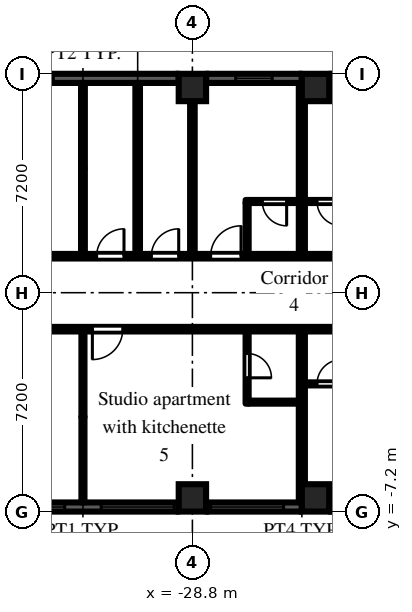
"""IFC4 building model, lengths in metres.
Left out: names, types, materials, properties, quantities, classifications, styles, units other than length and angle.
Written with IfcOpenShell. Run it as: python <this file> out.ifc"""

import sys

from ifc_helpers import new_model, si_unit, direction, frame, frame_2d, origin, origin_2d, place, context, subcontext, project, spatial, rectangle, extrude, element, fill, save


model = new_model("IFC4")
c1 = context("Model", 3, precision=1e-05, world=origin(), true_north=direction((0.0, 1.0)))
c2 = subcontext(c1, "Body", "Model", "MODEL_VIEW")
j1 = project(units=[si_unit("LENGTHUNIT", "METRE"), si_unit("PLANEANGLEUNIT", "RADIAN")], contexts=[c1])
p1 = place(None, origin())
s1 = spatial("IfcSite", under=j1, at=p1, CompositionType="ELEMENT")
p2 = place(p1, origin())
s2 = spatial("IfcBuilding", under=s1, at=p2, CompositionType="ELEMENT")
p3 = place(p2, frame((0.0, 0.0, 44.7)))
s3 = spatial("IfcBuildingStorey", under=s2, at=p3, CompositionType="ELEMENT", Elevation=44.7)
for number, where, z_axis, x_axis in (
    (1, (-28.8, -6.75, 0.0), (0.0, 0.0, 1.0), (1.0, 0.0, 0.0)),
    (2, (-28.8, 6.75, 0.0), (0.0, 0.0, 1.0), (1.0, 0.0, 0.0)),
    (3, (-24.75, -6.75, 0.0), (0.0, 0.0, 1.0), (1.0, 0.0, 0.0)),
    (4, (-24.75, 6.75, 0.0), (0.0, 0.0, 1.0), (1.0, 0.0, 0.0)),
):
    element("IfcColumn", number, at=place(p3, frame(where, z_axis=z_axis, x_axis=x_axis)), inside=s3, PredefinedType="COLUMN", context=c2, shape_type="SweptSolid", body=[
        extrude(rectangle(XDim=0.9, YDim=0.9, at=origin_2d()), origin(), (0.0, 0.0, 1.0), 3.0),
    ])
p4 = place(p3, frame((-21.6, 7.05, 0.0), z_axis=(0.0, 0.0, 1.0), x_axis=(-1.0, 0.0, 0.0)))
e5 = element("IfcWall", 5, at=p4, inside=s3, PredefinedType="SOLIDWALL", context=c2, shape_type="SweptSolid", body=[
    extrude(rectangle(XDim=2.7, YDim=0.3, at=frame_2d((1.35, 0.0))), origin(), (0.0, 0.0, 1.0), 2.1),
])
p5 = place(p4, frame((0.75, 0.0, 0.2)))
e6 = element("IfcOpeningElement", 6, at=p5, cuts=e5, PredefinedType="OPENING", context=c2, shape_type="SweptSolid", body=[
    extrude(rectangle(XDim=1.2, YDim=1.85, at=frame_2d((0.6, 0.925))), frame((0.0, 0.16, 0.0), z_axis=(0.0, -1.0, 0.0), x_axis=(1.0, 0.0, 0.0)), (0.0, 0.0, 1.0), 0.32),
])
p6 = place(p3, frame((-25.2, 7.05, 0.0), z_axis=(0.0, 0.0, 1.0), x_axis=(-1.0, 0.0, 0.0)))
e7 = element("IfcWall", 7, at=p6, inside=s3, PredefinedType="SOLIDWALL", context=c2, shape_type="SweptSolid", body=[
    extrude(rectangle(XDim=3.15, YDim=0.3, at=frame_2d((1.575, 0.0))), origin(), (0.0, 0.0, 1.0), 2.1),
])
p7 = place(p6, frame((0.975, 0.0, 0.2)))
e8 = element("IfcOpeningElement", 8, at=p7, cuts=e7, PredefinedType="OPENING", context=c2, shape_type="SweptSolid", body=[
    extrude(rectangle(XDim=1.2, YDim=1.85, at=frame_2d((0.6, 0.925))), frame((0.0, 0.16, 0.0), z_axis=(0.0, -1.0, 0.0), x_axis=(1.0, 0.0, 0.0)), (0.0, 0.0, 1.0), 0.32),
])
p8 = place(p3, frame((-29.25, 7.05, 0.0), z_axis=(0.0, 0.0, 1.0), x_axis=(-1.0, 0.0, 0.0)))
e9 = element("IfcWall", 9, at=p8, inside=s3, PredefinedType="SOLIDWALL", context=c2, shape_type="SweptSolid", body=[
    extrude(rectangle(XDim=6.3, YDim=0.3, at=frame_2d((3.15, 0.0))), origin(), (0.0, 0.0, 1.0), 2.1),
])
p9 = place(p8, frame((4.125, 0.0, 0.2)))
e10 = element("IfcOpeningElement", 10, at=p9, cuts=e9, PredefinedType="OPENING", context=c2, shape_type="SweptSolid", body=[
    extrude(rectangle(XDim=1.2, YDim=1.85, at=frame_2d((0.6, 0.925))), frame((0.0, 0.16, 0.0), z_axis=(0.0, -1.0, 0.0), x_axis=(1.0, 0.0, 0.0)), (0.0, 0.0, 1.0), 0.32),
])
p10 = place(p3, frame((-35.55, -7.05, 0.0), z_axis=(0.0, 0.0, 1.0), x_axis=(1.0, 0.0, 0.0)))
e11 = element("IfcWall", 11, at=p10, inside=s3, PredefinedType="SOLIDWALL", context=c2, shape_type="SweptSolid", body=[
    extrude(rectangle(XDim=6.3, YDim=0.3, at=frame_2d((3.15, 0.0))), origin(), (0.0, 0.0, 1.0), 2.1),
])
p11 = place(p10, frame((0.15, 0.0, 0.2)))
e12 = element("IfcOpeningElement", 12, at=p11, cuts=e11, PredefinedType="OPENING", context=c2, shape_type="SweptSolid", body=[
    extrude(rectangle(XDim=2.4, YDim=1.85, at=frame_2d((1.2, 0.925))), frame((0.0, 0.16, 0.0), z_axis=(0.0, -1.0, 0.0), x_axis=(1.0, 0.0, 0.0)), (0.0, 0.0, 1.0), 0.32),
])
p12 = place(p10, frame((3.75, 0.0, 0.2)))
e13 = element("IfcOpeningElement", 13, at=p12, cuts=e11, PredefinedType="OPENING", context=c2, shape_type="SweptSolid", body=[
    extrude(rectangle(XDim=2.4, YDim=1.85, at=frame_2d((1.2, 0.925))), frame((0.0, 0.16, 0.0), z_axis=(0.0, -1.0, 0.0), x_axis=(1.0, 0.0, 0.0)), (0.0, 0.0, 1.0), 0.32),
])
p13 = place(p3, frame((-28.35, -7.05, 0.0), z_axis=(0.0, 0.0, 1.0), x_axis=(1.0, 0.0, 0.0)))
e14 = element("IfcWall", 14, at=p13, inside=s3, PredefinedType="SOLIDWALL", context=c2, shape_type="SweptSolid", body=[
    extrude(rectangle(XDim=3.15, YDim=0.3, at=frame_2d((1.575, 0.0))), origin(), (0.0, 0.0, 1.0), 2.1),
])
p14 = place(p13, frame((0.15, 0.0, 0.2)))
e15 = element("IfcOpeningElement", 15, at=p14, cuts=e14, PredefinedType="OPENING", context=c2, shape_type="SweptSolid", body=[
    extrude(rectangle(XDim=2.4, YDim=1.85, at=frame_2d((1.2, 0.925))), frame((0.0, 0.16, 0.0), z_axis=(0.0, -1.0, 0.0), x_axis=(1.0, 0.0, 0.0)), (0.0, 0.0, 1.0), 0.32),
])
p15 = place(p3, frame((-24.3, -7.05, 0.0), z_axis=(0.0, 0.0, 1.0), x_axis=(1.0, 0.0, 0.0)))
e16 = element("IfcWall", 16, at=p15, inside=s3, PredefinedType="SOLIDWALL", context=c2, shape_type="SweptSolid", body=[
    extrude(rectangle(XDim=2.7, YDim=0.3, at=frame_2d((1.35, 0.0))), origin(), (0.0, 0.0, 1.0), 2.1),
])
p16 = place(p15, frame((0.75, 0.0, 0.2)))
e17 = element("IfcOpeningElement", 17, at=p16, cuts=e16, PredefinedType="OPENING", context=c2, shape_type="SweptSolid", body=[
    extrude(rectangle(XDim=1.2, YDim=1.85, at=frame_2d((0.6, 0.925))), frame((0.0, 0.16, 0.0), z_axis=(0.0, -1.0, 0.0), x_axis=(1.0, 0.0, 0.0)), (0.0, 0.0, 1.0), 0.32),
])
p17 = place(p3, frame((-36.5, -1.2, 0.0), z_axis=(0.0, 0.0, 1.0), x_axis=(1.0, 0.0, 0.0)))
e18 = element("IfcWall", 18, at=p17, inside=s3, PredefinedType="PARTITIONING", context=c2, shape_type="SweptSolid", body=[
    extrude(rectangle(XDim=14.9, YDim=0.15, at=frame_2d((7.45, 0.0))), origin(), (0.0, 0.0, 1.0), 2.575),
])
p18 = place(p17, frame((13.3, 0.0, 0.0)))
e19 = element("IfcOpeningElement", 19, at=p18, cuts=e18, PredefinedType="OPENING", context=c2, shape_type="SweptSolid", body=[
    extrude(rectangle(XDim=1.0, YDim=2.1, at=frame_2d((0.5, 1.05))), frame((0.0, 0.085, 0.0), z_axis=(0.0, -1.0, 0.0), x_axis=(1.0, 0.0, 0.0)), (0.0, 0.0, 1.0), 0.17),
])
p19 = place(p17, frame((4.41, 0.0, 0.0)))
e20 = element("IfcOpeningElement", 20, at=p19, cuts=e18, PredefinedType="OPENING", context=c2, shape_type="SweptSolid", body=[
    extrude(rectangle(XDim=1.0, YDim=2.1, at=frame_2d((0.5, 1.05))), frame((0.0, 0.085, 0.0), z_axis=(0.0, -1.0, 0.0), x_axis=(1.0, 0.0, 0.0)), (0.0, 0.0, 1.0), 0.17),
])
p20 = place(p17, frame((1.15, 0.0, 0.0)))
e21 = element("IfcOpeningElement", 21, at=p20, cuts=e18, PredefinedType="OPENING", context=c2, shape_type="SweptSolid", body=[
    extrude(rectangle(XDim=1.8, YDim=2.1, at=frame_2d((0.9, 1.05))), frame((0.0, 0.085, 0.0), z_axis=(0.0, -1.0, 0.0), x_axis=(1.0, 0.0, 0.0)), (0.0, 0.0, 1.0), 0.17),
])
p21 = place(p3, frame((-36.5, 1.2, 0.0), z_axis=(0.0, 0.0, 1.0), x_axis=(1.0, 0.0, 0.0)))
e22 = element("IfcWall", 22, at=p21, inside=s3, PredefinedType="PARTITIONING", context=c2, shape_type="SweptSolid", body=[
    extrude(rectangle(XDim=14.9, YDim=0.15, at=frame_2d((7.45, 0.0))), origin(), (0.0, 0.0, 1.0), 2.575),
])
p22 = place(p21, frame((13.7, 0.0, 0.0)))
e23 = element("IfcOpeningElement", 23, at=p22, cuts=e22, PredefinedType="OPENING", context=c2, shape_type="SweptSolid", body=[
    extrude(rectangle(XDim=1.0, YDim=2.1, at=frame_2d((0.5, 1.05))), frame((0.0, 0.085, 0.0), z_axis=(0.0, -1.0, 0.0), x_axis=(1.0, 0.0, 0.0)), (0.0, 0.0, 1.0), 0.17),
])
p23 = place(p21, frame((8.3, 0.0, 0.0)))
e24 = element("IfcOpeningElement", 24, at=p23, cuts=e22, PredefinedType="OPENING", context=c2, shape_type="SweptSolid", body=[
    extrude(rectangle(XDim=1.0, YDim=2.1, at=frame_2d((0.5, 1.05))), frame((0.0, 0.085, 0.0), z_axis=(0.0, -1.0, 0.0), x_axis=(1.0, 0.0, 0.0)), (0.0, 0.0, 1.0), 0.17),
])
p24 = place(p21, frame((6.35, 0.0, 0.0)))
e25 = element("IfcOpeningElement", 25, at=p24, cuts=e22, PredefinedType="OPENING", context=c2, shape_type="SweptSolid", body=[
    extrude(rectangle(XDim=0.9, YDim=2.1, at=frame_2d((0.45, 1.05))), frame((0.0, 0.085, 0.0), z_axis=(0.0, -1.0, 0.0), x_axis=(1.0, 0.0, 0.0)), (0.0, 0.0, 1.0), 0.17),
])
p25 = place(p21, frame((4.55, 0.0, 0.0)))
e26 = element("IfcOpeningElement", 26, at=p25, cuts=e22, PredefinedType="OPENING", context=c2, shape_type="SweptSolid", body=[
    extrude(rectangle(XDim=0.9, YDim=2.1, at=frame_2d((0.45, 1.05))), frame((0.0, 0.085, 0.0), z_axis=(0.0, -1.0, 0.0), x_axis=(1.0, 0.0, 0.0)), (0.0, 0.0, 1.0), 0.17),
])
p26 = place(p21, frame((1.15, 0.0, 0.0)))
e27 = element("IfcOpeningElement", 27, at=p26, cuts=e22, PredefinedType="OPENING", context=c2, shape_type="SweptSolid", body=[
    extrude(rectangle(XDim=1.8, YDim=2.1, at=frame_2d((0.9, 1.05))), frame((0.0, 0.085, 0.0), z_axis=(0.0, -1.0, 0.0), x_axis=(1.0, 0.0, 0.0)), (0.0, 0.0, 1.0), 0.17),
])
p27 = place(p3, frame((-32.4, -6.9, 0.0), z_axis=(0.0, 0.0, 1.0), x_axis=(0.0, 1.0, 0.0)))
e28 = element("IfcWall", 28, at=p27, inside=s3, PredefinedType="PARTITIONING", context=c2, shape_type="SweptSolid", body=[
    extrude(rectangle(XDim=5.625, YDim=0.1, at=frame_2d((2.812, 0.0))), origin(), (0.0, 0.0, 1.0), 2.575),
])
p28 = place(p3, frame((-32.4, 1.275, 0.0), z_axis=(0.0, 0.0, 1.0), x_axis=(0.0, 1.0, 0.0)))
e29 = element("IfcWall", 29, at=p28, inside=s3, PredefinedType="PARTITIONING", context=c2, shape_type="SweptSolid", body=[
    extrude(rectangle(XDim=5.625, YDim=0.125, at=frame_2d((2.812, 0.0))), origin(), (0.0, 0.0, 1.0), 2.575),
])
for number, where, z_axis, x_axis in (
    (30, (-30.6, 1.275, 0.0), (0.0, 0.0, 1.0), (0.0, 1.0, 0.0)),
    (31, (-28.8, 1.275, 0.0), (0.0, 0.0, 1.0), (0.0, 1.0, 0.0)),
):
    element("IfcWall", number, at=place(p3, frame(where, z_axis=z_axis, x_axis=x_axis)), inside=s3, PredefinedType="PARTITIONING", context=c2, shape_type="SweptSolid", body=[
        extrude(rectangle(XDim=5.625, YDim=0.15, at=frame_2d((2.812, 0.0))), origin(), (0.0, 0.0, 1.0), 2.575),
    ])
p29 = place(p3, frame((-27.0, -3.65, 0.0), z_axis=(0.0, 0.0, 1.0), x_axis=(0.0, 1.0, 0.0)))
e32 = element("IfcWall", 32, at=p29, inside=s3, PredefinedType="PARTITIONING", context=c2, shape_type="SweptSolid", body=[
    extrude(rectangle(XDim=2.375, YDim=0.1, at=frame_2d((1.188, 0.0))), origin(), (0.0, 0.0, 1.0), 2.575),
])
p30 = place(p29, frame((0.85, 0.0, 0.0)))
e33 = element("IfcOpeningElement", 33, at=p30, cuts=e32, PredefinedType="OPENING", context=c2, shape_type="SweptSolid", body=[
    extrude(rectangle(XDim=0.8, YDim=2.1, at=frame_2d((0.4, 1.05))), frame((0.0, 0.06, 0.0), z_axis=(0.0, -1.0, 0.0), x_axis=(1.0, 0.0, 0.0)), (0.0, 0.0, 1.0), 0.12),
])
p31 = place(p3, frame((-26.95, -3.6, 0.0), z_axis=(0.0, 0.0, 1.0), x_axis=(1.0, 0.0, 0.0)))
e34 = element("IfcWall", 34, at=p31, inside=s3, PredefinedType="PARTITIONING", context=c2, shape_type="SweptSolid", body=[
    extrude(rectangle(XDim=1.65, YDim=0.1, at=frame_2d((0.825, 0.0))), origin(), (0.0, 0.0, 1.0), 2.575),
])
p32 = place(p3, frame((-27.0, 1.275, 0.0), z_axis=(0.0, 0.0, 1.0), x_axis=(0.0, 1.0, 0.0)))
e35 = element("IfcWall", 35, at=p32, inside=s3, PredefinedType="PARTITIONING", context=c2, shape_type="SweptSolid", body=[
    extrude(rectangle(XDim=1.675, YDim=0.1, at=frame_2d((0.837, 0.0))), origin(), (0.0, 0.0, 1.0), 2.575),
])
p33 = place(p3, frame((-27.05, 3.0, 0.0), z_axis=(0.0, 0.0, 1.0), x_axis=(1.0, 0.0, 0.0)))
e36 = element("IfcWall", 36, at=p33, inside=s3, PredefinedType="PARTITIONING", context=c2, shape_type="SweptSolid", body=[
    extrude(rectangle(XDim=3.7, YDim=0.1, at=frame_2d((1.85, 0.0))), origin(), (0.0, 0.0, 1.0), 2.575),
])
p34 = place(p33, frame((2.35, 0.0, 0.0)))
e37 = element("IfcOpeningElement", 37, at=p34, cuts=e36, PredefinedType="OPENING", context=c2, shape_type="SweptSolid", body=[
    extrude(rectangle(XDim=0.8, YDim=2.1, at=frame_2d((0.4, 1.05))), frame((0.0, 0.06, 0.0), z_axis=(0.0, -1.0, 0.0), x_axis=(1.0, 0.0, 0.0)), (0.0, 0.0, 1.0), 0.12),
])
p35 = place(p33, frame((0.55, 0.0, 0.0)))
e38 = element("IfcOpeningElement", 38, at=p35, cuts=e36, PredefinedType="OPENING", context=c2, shape_type="SweptSolid", body=[
    extrude(rectangle(XDim=0.8, YDim=2.1, at=frame_2d((0.4, 1.05))), frame((0.0, 0.06, 0.0), z_axis=(0.0, -1.0, 0.0), x_axis=(1.0, 0.0, 0.0)), (0.0, 0.0, 1.0), 0.12),
])
p36 = place(p3, frame((-25.2, -6.9, 0.0), z_axis=(0.0, 0.0, 1.0), x_axis=(0.0, 1.0, 0.0)))
e39 = element("IfcWall", 39, at=p36, inside=s3, PredefinedType="PARTITIONING", context=c2, shape_type="SweptSolid", body=[
    extrude(rectangle(XDim=5.625, YDim=0.2, at=frame_2d((2.812, 0.0))), origin(), (0.0, 0.0, 1.0), 2.575),
])
p37 = place(p3, frame((-25.1, -3.0, 0.0), z_axis=(0.0, 0.0, 1.0), x_axis=(1.0, 0.0, 0.0)))
e40 = element("IfcWall", 40, at=p37, inside=s3, PredefinedType="PARTITIONING", context=c2, shape_type="SweptSolid", body=[
    extrude(rectangle(XDim=1.75, YDim=0.1, at=frame_2d((0.875, 0.0))), origin(), (0.0, 0.0, 1.0), 2.575),
])
p38 = place(p37, frame((0.4, 0.0, 0.0)))
e41 = element("IfcOpeningElement", 41, at=p38, cuts=e40, PredefinedType="OPENING", context=c2, shape_type="SweptSolid", body=[
    extrude(rectangle(XDim=0.8, YDim=2.1, at=frame_2d((0.4, 1.05))), frame((0.0, 0.06, 0.0), z_axis=(0.0, -1.0, 0.0), x_axis=(1.0, 0.0, 0.0)), (0.0, 0.0, 1.0), 0.12),
])
p39 = place(p3, frame((-25.2, 1.275, 0.0), z_axis=(0.0, 0.0, 1.0), x_axis=(0.0, 1.0, 0.0)))
e42 = element("IfcWall", 42, at=p39, inside=s3, PredefinedType="PARTITIONING", context=c2, shape_type="SweptSolid", body=[
    extrude(rectangle(XDim=5.625, YDim=0.2, at=frame_2d((2.812, 0.0))), origin(), (0.0, 0.0, 1.0), 2.575),
])
p40 = place(p7, origin())
e43 = element("IfcWindow", 43, at=p40, inside=s3, PartitioningType="SINGLE_PANEL", PredefinedType="WINDOW", context=c2, shape_type="SweptSolid", body=[
    extrude(rectangle(XDim=1.2, YDim=1.85, at=frame_2d((0.6, 0.925))), frame((0.0, 0.03, 0.0), z_axis=(0.0, -1.0, 0.0), x_axis=(1.0, 0.0, 0.0)), (0.0, 0.0, 1.0), 0.06),
])
fill(e8, e43)
p41 = place(p9, origin())
e44 = element("IfcWindow", 44, at=p41, inside=s3, PartitioningType="SINGLE_PANEL", PredefinedType="WINDOW", context=c2, shape_type="SweptSolid", body=[
    extrude(rectangle(XDim=1.2, YDim=1.85, at=frame_2d((0.6, 0.925))), frame((0.0, 0.03, 0.0), z_axis=(0.0, -1.0, 0.0), x_axis=(1.0, 0.0, 0.0)), (0.0, 0.0, 1.0), 0.06),
])
fill(e10, e44)
p42 = place(p11, origin())
e45 = element("IfcWindow", 45, at=p42, inside=s3, PartitioningType="SINGLE_PANEL", PredefinedType="WINDOW", context=c2, shape_type="SweptSolid", body=[
    extrude(rectangle(XDim=2.4, YDim=1.85, at=frame_2d((1.2, 0.925))), frame((0.0, 0.03, 0.0), z_axis=(0.0, -1.0, 0.0), x_axis=(1.0, 0.0, 0.0)), (0.0, 0.0, 1.0), 0.06),
])
fill(e12, e45)
p43 = place(p12, origin())
e46 = element("IfcWindow", 46, at=p43, inside=s3, PartitioningType="SINGLE_PANEL", PredefinedType="WINDOW", context=c2, shape_type="SweptSolid", body=[
    extrude(rectangle(XDim=2.4, YDim=1.85, at=frame_2d((1.2, 0.925))), frame((0.0, 0.03, 0.0), z_axis=(0.0, -1.0, 0.0), x_axis=(1.0, 0.0, 0.0)), (0.0, 0.0, 1.0), 0.06),
])
fill(e13, e46)
p44 = place(p14, origin())
e47 = element("IfcWindow", 47, at=p44, inside=s3, PartitioningType="SINGLE_PANEL", PredefinedType="WINDOW", context=c2, shape_type="SweptSolid", body=[
    extrude(rectangle(XDim=2.4, YDim=1.85, at=frame_2d((1.2, 0.925))), frame((0.0, 0.03, 0.0), z_axis=(0.0, -1.0, 0.0), x_axis=(1.0, 0.0, 0.0)), (0.0, 0.0, 1.0), 0.06),
])
fill(e15, e47)
p45 = place(p38, origin())
e48 = element("IfcDoor", 48, at=p45, inside=s3, OperationType="SINGLE_SWING_RIGHT", PredefinedType="DOOR", context=c2, shape_type="SweptSolid", body=[
    extrude(rectangle(XDim=0.8, YDim=2.1, at=frame_2d((0.4, 1.05))), frame((0.0, 0.025, 0.0), z_axis=(0.0, -1.0, 0.0), x_axis=(1.0, 0.0, 0.0)), (0.0, 0.0, 1.0), 0.05),
])
fill(e41, e48)
p46 = place(p30, frame((0.8, 0.0, 0.0), z_axis=(0.0, 0.0, 1.0), x_axis=(-1.0, 0.0, 0.0)))
e49 = element("IfcDoor", 49, at=p46, inside=s3, OperationType="SINGLE_SWING_RIGHT", PredefinedType="DOOR", context=c2, shape_type="SweptSolid", body=[
    extrude(rectangle(XDim=0.8, YDim=2.1, at=frame_2d((0.4, 1.05))), frame((0.0, 0.025, 0.0), z_axis=(0.0, -1.0, 0.0), x_axis=(1.0, 0.0, 0.0)), (0.0, 0.0, 1.0), 0.05),
])
fill(e33, e49)
p47 = place(p19, frame((1.0, 0.0, 0.0), z_axis=(0.0, 0.0, 1.0), x_axis=(-1.0, 0.0, 0.0)))
e50 = element("IfcDoor", 50, at=p47, inside=s3, OperationType="SINGLE_SWING_RIGHT", PredefinedType="DOOR", context=c2, shape_type="SweptSolid", body=[
    extrude(rectangle(XDim=1.0, YDim=2.1, at=frame_2d((0.5, 1.05))), frame((0.0, 0.025, 0.0), z_axis=(0.0, -1.0, 0.0), x_axis=(1.0, 0.0, 0.0)), (0.0, 0.0, 1.0), 0.05),
])
fill(e20, e50)
p48 = place(p34, frame((0.8, 0.0, 0.0), z_axis=(0.0, 0.0, 1.0), x_axis=(-1.0, 0.0, 0.0)))
e51 = element("IfcDoor", 51, at=p48, inside=s3, OperationType="SINGLE_SWING_LEFT", PredefinedType="DOOR", context=c2, shape_type="SweptSolid", body=[
    extrude(rectangle(XDim=0.8, YDim=2.1, at=frame_2d((0.4, 1.05))), frame((0.0, 0.025, 0.0), z_axis=(0.0, -1.0, 0.0), x_axis=(1.0, 0.0, 0.0)), (0.0, 0.0, 1.0), 0.05),
])
fill(e37, e51)
p49 = place(p35, frame((0.8, 0.0, 0.0), z_axis=(0.0, 0.0, 1.0), x_axis=(-1.0, 0.0, 0.0)))
e52 = element("IfcDoor", 52, at=p49, inside=s3, OperationType="SINGLE_SWING_LEFT", PredefinedType="DOOR", context=c2, shape_type="SweptSolid", body=[
    extrude(rectangle(XDim=0.8, YDim=2.1, at=frame_2d((0.4, 1.05))), frame((0.0, 0.025, 0.0), z_axis=(0.0, -1.0, 0.0), x_axis=(1.0, 0.0, 0.0)), (0.0, 0.0, 1.0), 0.05),
])
fill(e38, e52)
p50 = place(p23, origin())
e53 = element("IfcDoor", 53, at=p50, inside=s3, OperationType="SINGLE_SWING_RIGHT", PredefinedType="DOOR", context=c2, shape_type="SweptSolid", body=[
    extrude(rectangle(XDim=1.0, YDim=2.1, at=frame_2d((0.5, 1.05))), frame((0.0, 0.025, 0.0), z_axis=(0.0, -1.0, 0.0), x_axis=(1.0, 0.0, 0.0)), (0.0, 0.0, 1.0), 0.05),
])
fill(e24, e53)
p51 = place(p24, origin())
e54 = element("IfcDoor", 54, at=p51, inside=s3, OperationType="SINGLE_SWING_RIGHT", PredefinedType="DOOR", context=c2, shape_type="SweptSolid", body=[
    extrude(rectangle(XDim=0.9, YDim=2.1, at=frame_2d((0.45, 1.05))), frame((0.0, 0.025, 0.0), z_axis=(0.0, -1.0, 0.0), x_axis=(1.0, 0.0, 0.0)), (0.0, 0.0, 1.0), 0.05),
])
fill(e25, e54)
p52 = place(p25, origin())
e55 = element("IfcDoor", 55, at=p52, inside=s3, OperationType="SINGLE_SWING_RIGHT", PredefinedType="DOOR", context=c2, shape_type="SweptSolid", body=[
    extrude(rectangle(XDim=0.9, YDim=2.1, at=frame_2d((0.45, 1.05))), frame((0.0, 0.025, 0.0), z_axis=(0.0, -1.0, 0.0), x_axis=(1.0, 0.0, 0.0)), (0.0, 0.0, 1.0), 0.05),
])
fill(e26, e55)
save(model, sys.argv[1])
